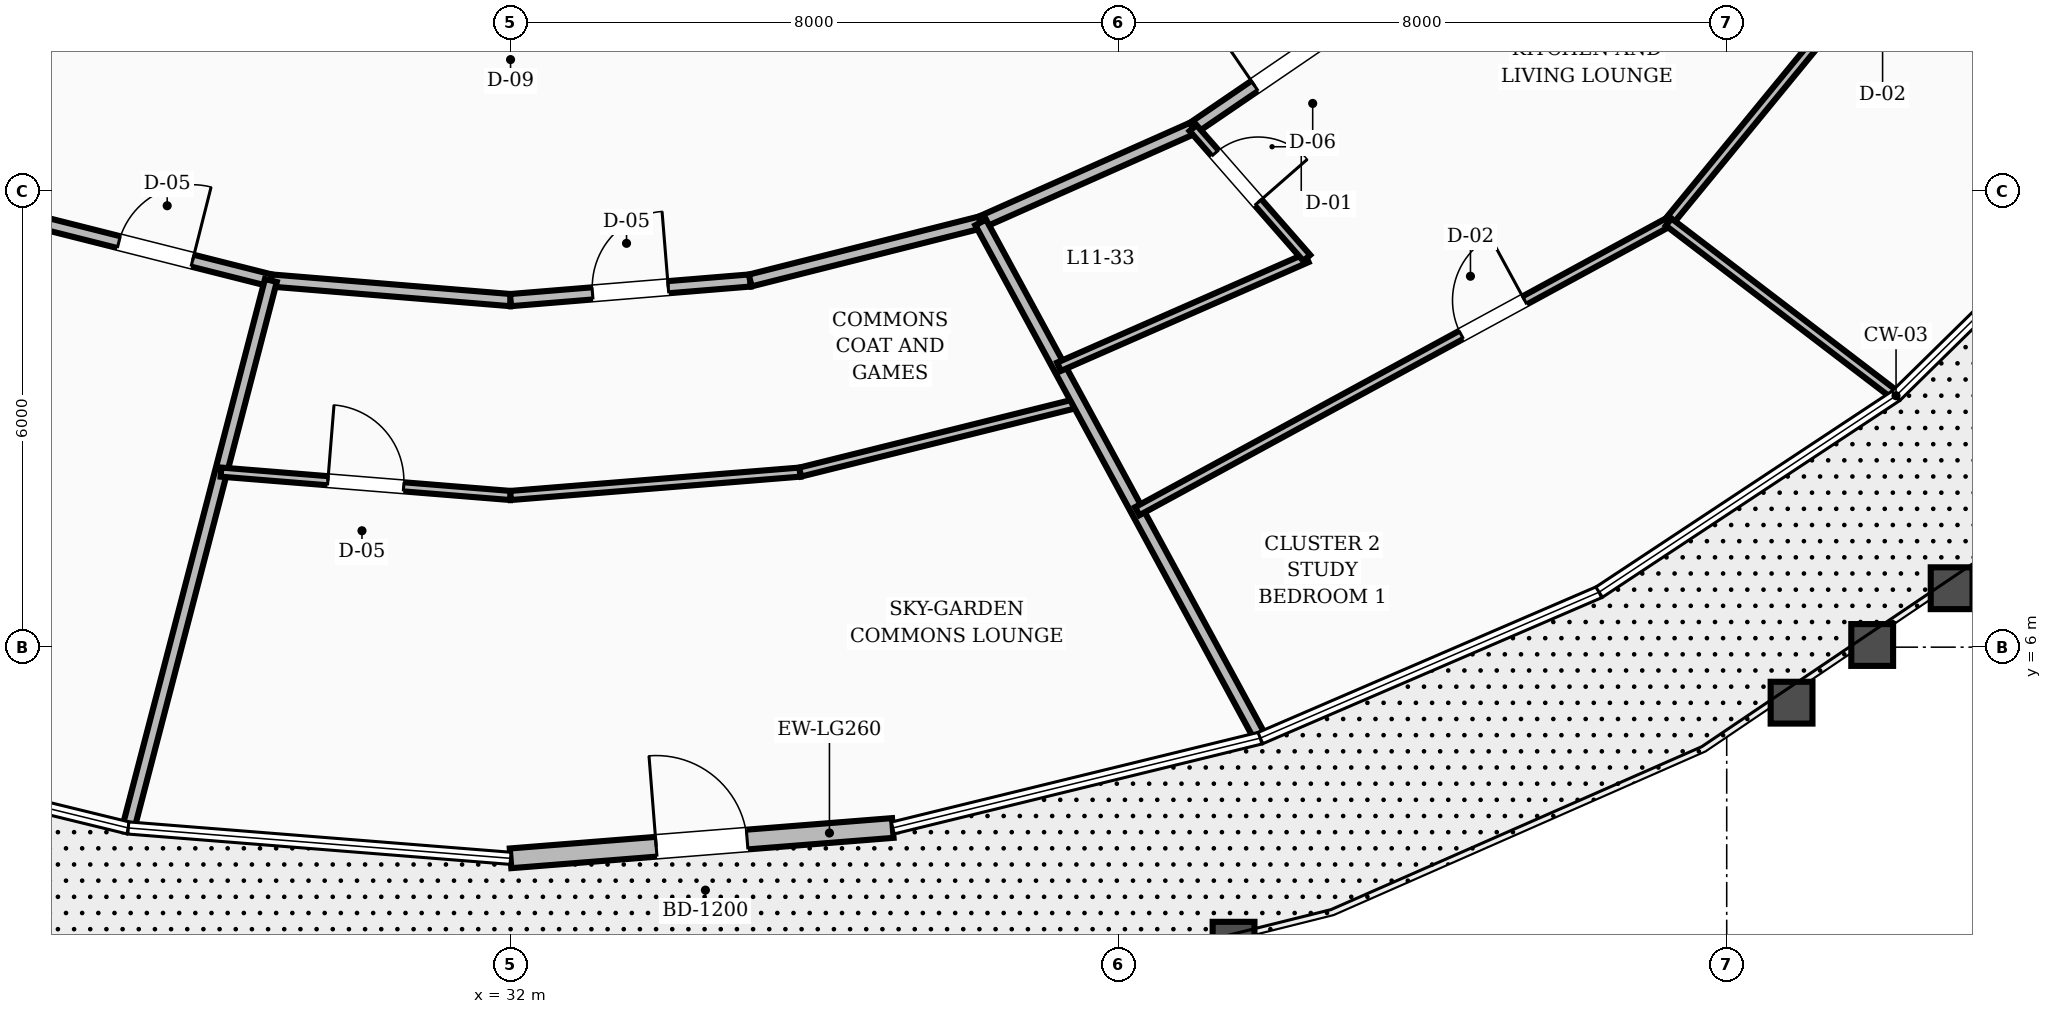
"""IFC4 building model, lengths in metres.
Left out: names, types, materials, properties, quantities, classifications, styles, units other than length and angle.
Written with IfcOpenShell. Run it as: python <this file> out.ifc"""

import sys

from ifc_helpers import new_model, si_unit, direction, frame, frame_2d, origin, place, context, subcontext, project, spatial, rectangle, extrude, element, fill, save


model = new_model("IFC4")
c1 = context("Model", 3, precision=1e-05, world=origin(), true_north=direction((0.0, 1.0)))
c2 = subcontext(c1, "Body", "Model", "MODEL_VIEW")
j1 = project(units=[si_unit("LENGTHUNIT", "METRE"), si_unit("PLANEANGLEUNIT", "RADIAN")], contexts=[c1])
p1 = place(None, origin())
s1 = spatial("IfcSite", under=j1, at=p1, CompositionType="ELEMENT")
p2 = place(p1, origin())
s2 = spatial("IfcBuilding", under=s1, at=p2, CompositionType="ELEMENT")
p3 = place(p2, frame((0.0, 0.0, 48.4)))
s3 = spatial("IfcBuildingStorey", under=s2, at=p3, CompositionType="ELEMENT", Elevation=48.4)
p4 = place(p3, frame((32.0, 3.222, 0.0), z_axis=(0.0, 0.0, 1.0), x_axis=(0.996864786715, 0.079123934476, 0.0)))
e1 = element("IfcWall", 1, at=p4, inside=s3, PredefinedType="STANDARD", context=c2, shape_type="SweptSolid", body=[
    extrude(rectangle(XDim=5.045, YDim=0.26, at=frame_2d((2.522, 0.0))), origin(), (0.0, 0.0, 1.0), 2.65),
])
p5 = place(p4, frame((1.922, 0.0, 0.0)))
e2 = element("IfcOpeningElement", 2, at=p5, cuts=e1, PredefinedType="OPENING", context=c2, shape_type="SweptSolid", body=[
    extrude(rectangle(XDim=1.2, YDim=2.15, at=frame_2d((0.6, 1.075))), frame((0.0, 0.14, 0.0), z_axis=(0.0, -1.0, 0.0), x_axis=(1.0, 0.0, 0.0)), (0.0, 0.0, 1.0), 0.28),
])
p6 = place(p3, frame((25.815, 11.589, 0.0), z_axis=(0.0, 0.0, 1.0), x_axis=(0.969653665365, -0.244482656326, 0.0)))
e3 = element("IfcWall", 3, at=p6, inside=s3, PredefinedType="SOLIDWALL", context=c2, shape_type="SweptSolid", body=[
    extrude(rectangle(XDim=3.127, YDim=0.16, at=frame_2d((1.563, 0.0))), origin(), (0.0, 0.0, 1.0), 2.61),
])
p7 = place(p6, frame((1.063, 0.0, 0.0)))
e4 = element("IfcOpeningElement", 4, at=p7, cuts=e3, PredefinedType="OPENING", context=c2, shape_type="SweptSolid", body=[
    extrude(rectangle(XDim=1.0, YDim=2.1, at=frame_2d((0.5, 1.05))), frame((0.0, 0.09, 0.0), z_axis=(0.0, -1.0, 0.0), x_axis=(1.0, 0.0, 0.0)), (0.0, 0.0, 1.0), 0.18),
])
p8 = place(p3, frame((28.847, 10.824, 0.0), z_axis=(0.0, 0.0, 1.0), x_axis=(0.996661331307, -0.081646743207, 0.0)))
e5 = element("IfcWall", 5, at=p8, inside=s3, PredefinedType="SOLIDWALL", context=c2, shape_type="SweptSolid", body=[
    extrude(rectangle(XDim=3.164, YDim=0.16, at=frame_2d((1.582, 0.0))), origin(), (0.0, 0.0, 1.0), 2.61),
])
p9 = place(p3, frame((32.0, 10.566, 0.0), z_axis=(0.0, 0.0, 1.0), x_axis=(0.996661331307, 0.081646743207, 0.0)))
e6 = element("IfcWall", 6, at=p9, inside=s3, PredefinedType="SOLIDWALL", context=c2, shape_type="SweptSolid", body=[
    extrude(rectangle(XDim=3.164, YDim=0.16, at=frame_2d((1.582, 0.0))), origin(), (0.0, 0.0, 1.0), 2.61),
])
p10 = place(p9, frame((1.082, 0.0, 0.0)))
e7 = element("IfcOpeningElement", 7, at=p10, cuts=e6, PredefinedType="OPENING", context=c2, shape_type="SweptSolid", body=[
    extrude(rectangle(XDim=1.0, YDim=2.1, at=frame_2d((0.5, 1.05))), frame((0.0, 0.09, 0.0), z_axis=(0.0, -1.0, 0.0), x_axis=(1.0, 0.0, 0.0)), (0.0, 0.0, 1.0), 0.18),
])
p11 = place(p3, frame((35.153, 10.824, 0.0), z_axis=(0.0, 0.0, 1.0), x_axis=(0.969653665365, 0.244482656326, 0.0)))
e8 = element("IfcWall", 8, at=p11, inside=s3, PredefinedType="SOLIDWALL", context=c2, shape_type="SweptSolid", body=[
    extrude(rectangle(XDim=3.127, YDim=0.16, at=frame_2d((1.563, 0.0))), origin(), (0.0, 0.0, 1.0), 2.61),
])
p12 = place(p3, frame((38.185, 11.589, 0.0), z_axis=(0.0, 0.0, 1.0), x_axis=(0.913860932409, 0.406027334321, 0.0)))
e9 = element("IfcWall", 9, at=p12, inside=s3, PredefinedType="SOLIDWALL", context=c2, shape_type="SweptSolid", body=[
    extrude(rectangle(XDim=3.058, YDim=0.16, at=frame_2d((1.529, 0.0))), origin(), (0.0, 0.0, 1.0), 2.61),
])
p13 = place(p3, frame((40.979, 12.83, 0.0), z_axis=(0.0, 0.0, 1.0), x_axis=(0.826112340767, 0.563505457323, 0.0)))
e10 = element("IfcWall", 10, at=p13, inside=s3, PredefinedType="SOLIDWALL", context=c2, shape_type="SweptSolid", body=[
    extrude(rectangle(XDim=2.965, YDim=0.16, at=frame_2d((1.482, 0.0))), origin(), (0.0, 0.0, 1.0), 2.61),
])
p14 = place(p13, frame((0.982, 0.0, 0.0)))
e11 = element("IfcOpeningElement", 11, at=p14, cuts=e10, PredefinedType="OPENING", context=c2, shape_type="SweptSolid", body=[
    extrude(rectangle(XDim=1.0, YDim=2.1, at=frame_2d((0.5, 1.05))), frame((0.0, 0.09, 0.0), z_axis=(0.0, -1.0, 0.0), x_axis=(1.0, 0.0, 0.0)), (0.0, 0.0, 1.0), 0.18),
])
p15 = place(p3, frame((28.847, 10.824, 0.0), z_axis=(0.0, 0.0, 1.0), x_axis=(-0.252026659799, -0.967720291588, 0.0)))
e12 = element("IfcWall", 12, at=p15, inside=s3, PredefinedType="SOLIDWALL", context=c2, shape_type="SweptSolid", body=[
    extrude(rectangle(XDim=7.393, YDim=0.16, at=frame_2d((3.697, 0.0))), origin(), (0.0, 0.0, 1.0), 2.61),
])
p16 = place(p3, frame((28.19, 8.303, 0.0), z_axis=(0.0, 0.0, 1.0), x_axis=(0.996760817286, -0.080423088244, 0.0)))
e13 = element("IfcWall", 13, at=p16, inside=s3, PredefinedType="PARTITIONING", context=c2, shape_type="SweptSolid", body=[
    extrude(rectangle(XDim=3.822, YDim=0.12, at=frame_2d((1.911, 0.0))), origin(), (0.0, 0.0, 1.0), 2.61),
])
p17 = place(p16, frame((1.411, 0.0, 0.0)))
e14 = element("IfcOpeningElement", 14, at=p17, cuts=e13, PredefinedType="OPENING", context=c2, shape_type="SweptSolid", body=[
    extrude(rectangle(XDim=1.0, YDim=2.1, at=frame_2d((0.5, 1.05))), frame((0.0, 0.07, 0.0), z_axis=(0.0, -1.0, 0.0), x_axis=(1.0, 0.0, 0.0)), (0.0, 0.0, 1.0), 0.14),
])
p18 = place(p3, frame((32.0, 7.996, 0.0), z_axis=(0.0, 0.0, 1.0), x_axis=(0.996760817286, 0.080423088244, 0.0)))
e15 = element("IfcWall", 15, at=p18, inside=s3, PredefinedType="PARTITIONING", context=c2, shape_type="SweptSolid", body=[
    extrude(rectangle(XDim=3.822, YDim=0.12, at=frame_2d((1.911, 0.0))), origin(), (0.0, 0.0, 1.0), 2.61),
])
p19 = place(p3, frame((35.81, 8.303, 0.0), z_axis=(0.0, 0.0, 1.0), x_axis=(0.970449874904, 0.241302797952, 0.0)))
e16 = element("IfcWall", 16, at=p19, inside=s3, PredefinedType="PARTITIONING", context=c2, shape_type="SweptSolid", body=[
    extrude(rectangle(XDim=3.775, YDim=0.12, at=frame_2d((1.887, 0.0))), origin(), (0.0, 0.0, 1.0), 2.61),
])
p20 = place(p3, frame((38.185, 11.589, 0.0), z_axis=(0.0, 0.0, 1.0), x_axis=(0.476776382482, -0.87902461917, 0.0)))
e17 = element("IfcWall", 17, at=p20, inside=s3, PredefinedType="SOLIDWALL", context=c2, shape_type="SweptSolid", body=[
    extrude(rectangle(XDim=7.669, YDim=0.16, at=frame_2d((3.834, 0.0))), origin(), (0.0, 0.0, 1.0), 2.61),
])
p21 = place(p3, frame((39.215, 9.689, 0.0), z_axis=(0.0, 0.0, 1.0), x_axis=(0.915615092878, 0.40205596836, 0.0)))
e18 = element("IfcWall", 18, at=p21, inside=s3, PredefinedType="PARTITIONING", context=c2, shape_type="SweptSolid", body=[
    extrude(rectangle(XDim=3.56, YDim=0.12, at=frame_2d((1.78, 0.0))), origin(), (0.0, 0.0, 1.0), 2.61),
])
p22 = place(p3, frame((40.979, 12.83, 0.0), z_axis=(0.0, 0.0, 1.0), x_axis=(0.658474178061, -0.752603319703, 0.0)))
e19 = element("IfcWall", 19, at=p22, inside=s3, PredefinedType="PARTITIONING", context=c2, shape_type="SweptSolid", body=[
    extrude(rectangle(XDim=2.272, YDim=0.12, at=frame_2d((1.136, 0.0))), origin(), (0.0, 0.0, 1.0), 2.61),
])
p23 = place(p22, frame((0.44, 0.0, 0.0)))
e20 = element("IfcOpeningElement", 20, at=p23, cuts=e19, PredefinedType="OPENING", context=c2, shape_type="SweptSolid", body=[
    extrude(rectangle(XDim=0.86, YDim=2.1, at=frame_2d((0.43, 1.05))), frame((0.0, 0.07, 0.0), z_axis=(0.0, -1.0, 0.0), x_axis=(1.0, 0.0, 0.0)), (0.0, 0.0, 1.0), 0.14),
])
p24 = place(p3, frame((40.246, 7.789, 0.0), z_axis=(0.0, 0.0, 1.0), x_axis=(0.8783980486, 0.477929773309, 0.0)))
e21 = element("IfcWall", 21, at=p24, inside=s3, PredefinedType="PARTITIONING", context=c2, shape_type="SweptSolid", body=[
    extrude(rectangle(XDim=7.958, YDim=0.12, at=frame_2d((3.979, 0.0))), origin(), (0.0, 0.0, 1.0), 2.61),
])
p25 = place(p24, frame((4.852, 0.0, 0.0)))
e22 = element("IfcOpeningElement", 22, at=p25, cuts=e21, PredefinedType="OPENING", context=c2, shape_type="SweptSolid", body=[
    extrude(rectangle(XDim=0.95, YDim=2.1, at=frame_2d((0.475, 1.05))), frame((0.0, 0.07, 0.0), z_axis=(0.0, -1.0, 0.0), x_axis=(1.0, 0.0, 0.0)), (0.0, 0.0, 1.0), 0.14),
])
p26 = place(p3, frame((47.236, 11.593, 0.0), z_axis=(0.0, 0.0, 1.0), x_axis=(0.634298828671, 0.773087961326, 0.0)))
e23 = element("IfcWall", 23, at=p26, inside=s3, PredefinedType="PARTITIONING", context=c2, shape_type="SweptSolid", body=[
    extrude(rectangle(XDim=7.364, YDim=0.12, at=frame_2d((3.682, 0.0))), origin(), (0.0, 0.0, 1.0), 2.61),
])
p27 = place(p26, frame((3.207, 0.0, 0.0)))
e24 = element("IfcOpeningElement", 24, at=p27, cuts=e23, PredefinedType="OPENING", context=c2, shape_type="SweptSolid", body=[
    extrude(rectangle(XDim=0.95, YDim=2.1, at=frame_2d((0.475, 1.05))), frame((0.0, 0.07, 0.0), z_axis=(0.0, -1.0, 0.0), x_axis=(1.0, 0.0, 0.0)), (0.0, 0.0, 1.0), 0.14),
])
p28 = place(p3, frame((47.236, 11.593, 0.0), z_axis=(0.0, 0.0, 1.0), x_axis=(0.794708437358, -0.606991350509, 0.0)))
e25 = element("IfcWall", 25, at=p28, inside=s3, PredefinedType="PARTITIONING", context=c2, shape_type="SweptSolid", body=[
    extrude(rectangle(XDim=3.714, YDim=0.12, at=frame_2d((1.857, 0.0))), origin(), (0.0, 0.0, 1.0), 2.61),
])
p29 = place(p5, origin())
e26 = element("IfcDoor", 26, at=p29, inside=s3, OperationType="SINGLE_SWING_LEFT", PredefinedType="DOOR", context=c2, shape_type="SweptSolid", body=[
    extrude(rectangle(XDim=1.2, YDim=2.15, at=frame_2d((0.6, 1.075))), frame((0.0, 0.025, 0.0), z_axis=(0.0, -1.0, 0.0), x_axis=(1.0, 0.0, 0.0)), (0.0, 0.0, 1.0), 0.05),
])
fill(e2, e26)
p30 = place(p10, origin())
e27 = element("IfcDoor", 27, at=p30, inside=s3, OperationType="SINGLE_SWING_RIGHT", PredefinedType="DOOR", context=c2, shape_type="SweptSolid", body=[
    extrude(rectangle(XDim=1.0, YDim=2.1, at=frame_2d((0.5, 1.05))), frame((0.0, 0.025, 0.0), z_axis=(0.0, -1.0, 0.0), x_axis=(1.0, 0.0, 0.0)), (0.0, 0.0, 1.0), 0.05),
])
fill(e7, e27)
p31 = place(p17, origin())
e28 = element("IfcDoor", 28, at=p31, inside=s3, OperationType="SINGLE_SWING_LEFT", PredefinedType="DOOR", context=c2, shape_type="SweptSolid", body=[
    extrude(rectangle(XDim=1.0, YDim=2.1, at=frame_2d((0.5, 1.05))), frame((0.0, 0.025, 0.0), z_axis=(0.0, -1.0, 0.0), x_axis=(1.0, 0.0, 0.0)), (0.0, 0.0, 1.0), 0.05),
])
fill(e14, e28)
p32 = place(p23, origin())
e29 = element("IfcDoor", 29, at=p32, inside=s3, OperationType="SINGLE_SWING_RIGHT", PredefinedType="DOOR", context=c2, shape_type="SweptSolid", body=[
    extrude(rectangle(XDim=0.86, YDim=2.1, at=frame_2d((0.43, 1.05))), frame((0.0, 0.025, 0.0), z_axis=(0.0, -1.0, 0.0), x_axis=(1.0, 0.0, 0.0)), (0.0, 0.0, 1.0), 0.05),
])
fill(e20, e29)
p33 = place(p14, origin())
e30 = element("IfcDoor", 30, at=p33, inside=s3, OperationType="SINGLE_SWING_LEFT", PredefinedType="DOOR", context=c2, shape_type="SweptSolid", body=[
    extrude(rectangle(XDim=1.0, YDim=2.1, at=frame_2d((0.5, 1.05))), frame((0.0, 0.025, 0.0), z_axis=(0.0, -1.0, 0.0), x_axis=(1.0, 0.0, 0.0)), (0.0, 0.0, 1.0), 0.05),
])
fill(e11, e30)
p34 = place(p25, origin())
e31 = element("IfcDoor", 31, at=p34, inside=s3, OperationType="SINGLE_SWING_RIGHT", PredefinedType="DOOR", context=c2, shape_type="SweptSolid", body=[
    extrude(rectangle(XDim=0.95, YDim=2.1, at=frame_2d((0.475, 1.05))), frame((0.0, 0.025, 0.0), z_axis=(0.0, -1.0, 0.0), x_axis=(1.0, 0.0, 0.0)), (0.0, 0.0, 1.0), 0.05),
])
fill(e22, e31)
p35 = place(p7, origin())
e32 = element("IfcDoor", 32, at=p35, inside=s3, OperationType="SINGLE_SWING_RIGHT", PredefinedType="DOOR", context=c2, shape_type="SweptSolid", body=[
    extrude(rectangle(XDim=1.0, YDim=2.1, at=frame_2d((0.5, 1.05))), frame((0.0, 0.025, 0.0), z_axis=(0.0, -1.0, 0.0), x_axis=(1.0, 0.0, 0.0)), (0.0, 0.0, 1.0), 0.05),
])
fill(e4, e32)
save(model, sys.argv[1])
